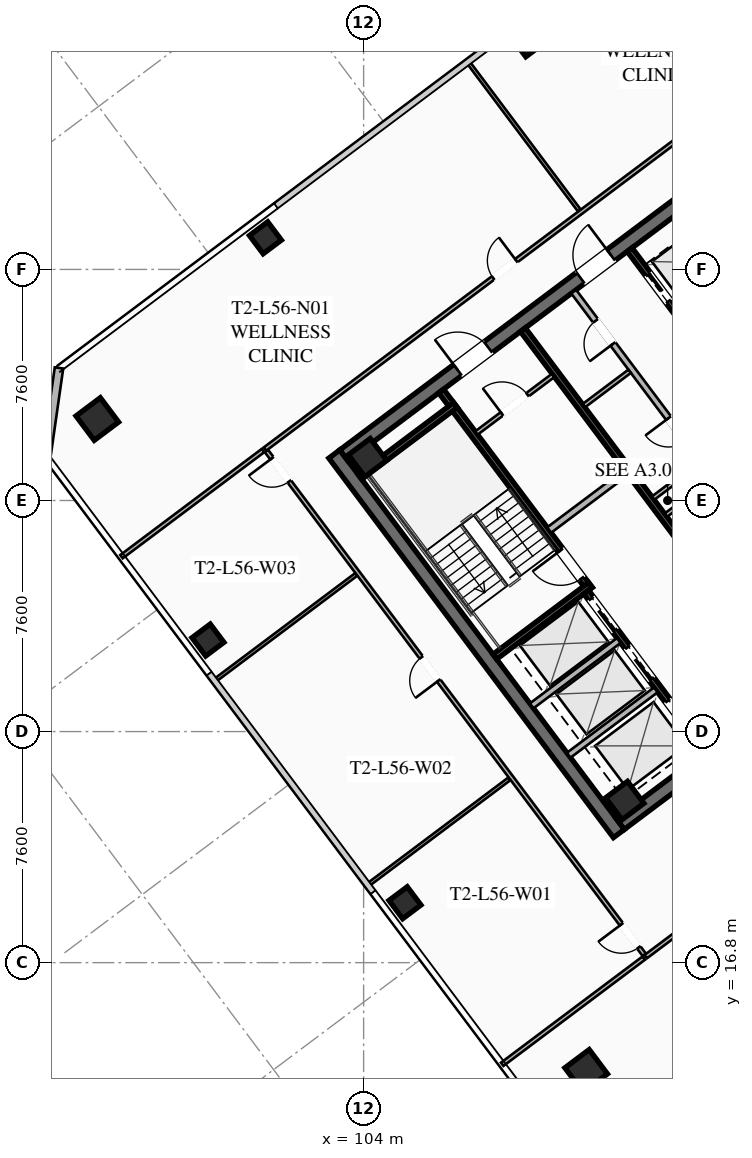
"""IFC4 building model, lengths in metres.
Left out: names, types, materials, properties, quantities, classifications, styles, units other than length and angle.
Written with IfcOpenShell. Run it as: python <this file> out.ifc"""

import sys

from ifc_helpers import new_model, si_unit, direction, frame, frame_2d, origin, origin_2d, place, context, subcontext, project, spatial, rectangle, hollow_rectangle, extrude, element, fill, save


model = new_model("IFC4")
c1 = context("Model", 3, precision=1e-05, world=origin(), true_north=direction((0.0, 1.0)))
c2 = subcontext(c1, "Body", "Model", "MODEL_VIEW")
j1 = project(units=[si_unit("LENGTHUNIT", "METRE"), si_unit("PLANEANGLEUNIT", "RADIAN")], contexts=[c1])
p1 = place(None, origin())
s1 = spatial("IfcSite", under=j1, at=p1, CompositionType="ELEMENT")
p2 = place(p1, origin())
s2 = spatial("IfcBuilding", under=s1, at=p2, CompositionType="ELEMENT")
p3 = place(p2, frame((0.0, 0.0, 207.75)))
s3 = spatial("IfcBuildingStorey", under=s2, at=p3, CompositionType="ELEMENT", Elevation=207.75)
p4 = place(p3, frame((112.396, 21.047, 0.0), z_axis=(0.0, 0.0, 1.0), x_axis=(-0.600005007985, 0.799996243986, 0.0)))
e1 = element("IfcWall", 1, at=p4, inside=s3, PredefinedType="SHEAR", context=c2, shape_type="SweptSolid", body=[
    extrude(rectangle(XDim=15.6, YDim=0.45, at=frame_2d((7.8, 0.0))), origin(), (0.0, 0.0, 1.0), 3.55),
])
p5 = place(p3, frame((124.649, 30.518, 0.0), z_axis=(0.0, 0.0, 1.0), x_axis=(-0.8, -0.6, 0.0)))
e2 = element("IfcWall", 2, at=p5, inside=s3, PredefinedType="SHEAR", context=c2, shape_type="SweptSolid", body=[
    extrude(rectangle(XDim=15.26, YDim=0.45, at=frame_2d((7.63, 0.0))), origin(), (0.0, 0.0, 1.0), 3.55),
])
p6 = place(p5, frame((9.33, 0.0, 0.0)))
e3 = element("IfcOpeningElement", 3, at=p6, cuts=e2, PredefinedType="OPENING", context=c2, shape_type="SweptSolid", body=[
    extrude(rectangle(XDim=1.25, YDim=2.25, at=frame_2d((0.625, 1.125))), frame((0.0, 0.235, 0.0), z_axis=(0.0, -1.0, 0.0), x_axis=(1.0, 0.0, 0.0)), (0.0, 0.0, 1.0), 0.47),
])
p7 = place(p5, frame((4.28, 0.0, 0.0)))
e4 = element("IfcOpeningElement", 4, at=p7, cuts=e2, PredefinedType="OPENING", context=c2, shape_type="SweptSolid", body=[
    extrude(rectangle(XDim=1.25, YDim=2.25, at=frame_2d((0.625, 1.125))), frame((0.0, 0.235, 0.0), z_axis=(0.0, -1.0, 0.0), x_axis=(1.0, 0.0, 0.0)), (0.0, 0.0, 1.0), 0.47),
])
p8 = place(p3, frame((103.351, 33.482, 0.0), z_axis=(0.0, 0.0, 1.0), x_axis=(0.8, 0.6, 0.0)))
e5 = element("IfcWall", 5, at=p8, inside=s3, PredefinedType="SHEAR", context=c2, shape_type="SweptSolid", body=[
    extrude(rectangle(XDim=15.26, YDim=0.45, at=frame_2d((7.63, 0.0))), origin(), (0.0, 0.0, 1.0), 3.55),
])
p9 = place(p8, frame((4.68, 0.0, 0.0)))
e6 = element("IfcOpeningElement", 6, at=p9, cuts=e5, PredefinedType="OPENING", context=c2, shape_type="SweptSolid", body=[
    extrude(rectangle(XDim=1.25, YDim=2.25, at=frame_2d((0.625, 1.125))), frame((0.0, 0.235, 0.0), z_axis=(0.0, -1.0, 0.0), x_axis=(1.0, 0.0, 0.0)), (0.0, 0.0, 1.0), 0.47),
])
p10 = place(p8, frame((9.73, 0.0, 0.0)))
e7 = element("IfcOpeningElement", 7, at=p10, cuts=e5, PredefinedType="OPENING", context=c2, shape_type="SweptSolid", body=[
    extrude(rectangle(XDim=1.25, YDim=2.25, at=frame_2d((0.625, 1.125))), frame((0.0, 0.235, 0.0), z_axis=(0.0, -1.0, 0.0), x_axis=(1.0, 0.0, 0.0)), (0.0, 0.0, 1.0), 0.47),
])
for number, where, z_axis, x_axis in (
    (8, (112.59, 22.13, 0.0), (0.0, 0.0, 1.0), (0.8, 0.6, 0.0)),
    (9, (104.13, 33.41, 0.0), (0.0, 0.0, 1.0), (0.8, 0.6, 0.0)),
):
    element("IfcColumn", number, at=place(p3, frame(where, z_axis=z_axis, x_axis=x_axis)), inside=s3, PredefinedType="COLUMN", context=c2, shape_type="SweptSolid", body=[
        extrude(hollow_rectangle(XDim=0.9, YDim=0.9, WallThickness=0.04, at=origin_2d()), origin(), (0.0, 0.0, 1.0), 3.37),
    ])
for number, where, z_axis, x_axis in (
    (10, (111.32, 13.24, 0.0), (0.0, 0.0, 1.0), (0.8, 0.6, 0.0)),
    (11, (95.24, 34.68, 0.0), (0.0, 0.0, 1.0), (0.8, 0.6, 0.0)),
):
    element("IfcColumn", number, at=place(p3, frame(where, z_axis=z_axis, x_axis=x_axis)), inside=s3, PredefinedType="COLUMN", context=c2, shape_type="SweptSolid", body=[
        extrude(hollow_rectangle(XDim=1.0, YDim=1.0, WallThickness=0.04, at=origin_2d()), origin(), (0.0, 0.0, 1.0), 3.37),
    ])
for number, where, z_axis, x_axis in (
    (12, (109.41, 47.12, 0.0), (0.0, 0.0, 1.0), (0.8, 0.6, 0.0)),
    (13, (100.77, 40.64, 0.0), (0.0, 0.0, 1.0), (0.8, 0.6, 0.0)),
    (14, (98.88, 27.41, 0.0), (0.0, 0.0, 1.0), (0.8, 0.6, 0.0)),
    (15, (105.36, 18.77, 0.0), (0.0, 0.0, 1.0), (0.8, 0.6, 0.0)),
):
    element("IfcColumn", number, at=place(p3, frame(where, z_axis=z_axis, x_axis=x_axis)), inside=s3, PredefinedType="COLUMN", context=c2, shape_type="SweptSolid", body=[
        extrude(hollow_rectangle(XDim=0.75, YDim=0.75, WallThickness=0.032, at=origin_2d()), origin(), (0.0, 0.0, 1.0), 3.37),
    ])
p11 = place(p3, frame((93.56, 33.42, 0.0), z_axis=(0.0, 0.0, 1.0), x_axis=(0.14138683146, 0.989954425158, 0.0)))
e16 = element("IfcWall", 16, at=p11, inside=s3, PredefinedType="SOLIDWALL", context=c2, shape_type="SweptSolid", body=[
    extrude(rectangle(XDim=2.97, YDim=0.28, at=frame_2d((1.485, 0.0))), origin(), (0.0, 0.0, 1.0), 3.37),
])
p12 = place(p3, frame((111.44, 29.08, 0.0), z_axis=(0.0, 0.0, 1.0), x_axis=(-0.59999041401, 0.800007189403, 0.0)))
e17 = element("IfcWall", 17, at=p12, inside=s3, PredefinedType="SHEAR", context=c2, shape_type="SweptSolid", body=[
    extrude(rectangle(XDim=8.15, YDim=0.2, at=frame_2d((4.075, 0.0))), origin(), (0.0, 0.0, 1.0), 3.37),
])
p13 = place(p12, frame((0.45, 0.0, 0.0)))
e18 = element("IfcOpeningElement", 18, at=p13, cuts=e17, PredefinedType="OPENING", context=c2, shape_type="SweptSolid", body=[
    extrude(rectangle(XDim=1.15, YDim=2.2, at=frame_2d((0.575, 1.1))), frame((0.0, 0.11, 0.0), z_axis=(0.0, -1.0, 0.0), x_axis=(1.0, 0.0, 0.0)), (0.0, 0.0, 1.0), 0.22),
])
for number, where, z_axis, x_axis in (
    (19, (108.316, 26.862, 0.0), (0.0, 0.0, 1.0), (0.8, 0.6, 0.0)),
    (20, (103.876, 32.782, 0.0), (0.0, 0.0, 1.0), (0.8, 0.6, 0.0)),
):
    element("IfcWall", number, at=place(p3, frame(where, z_axis=z_axis, x_axis=x_axis)), inside=s3, PredefinedType="SHEAR", context=c2, shape_type="SweptSolid", body=[
        extrude(rectangle(XDim=3.93, YDim=0.2, at=frame_2d((1.965, 0.0))), origin(), (0.0, 0.0, 1.0), 3.37),
    ])
p14 = place(p3, frame((118.058, 25.856, 0.0), z_axis=(0.0, 0.0, 1.0), x_axis=(-0.600002657301, 0.799998007018, 0.0)))
e21 = element("IfcWall", 21, at=p14, inside=s3, PredefinedType="SHEAR", context=c2, shape_type="SweptSolid", body=[
    extrude(rectangle(XDim=14.7, YDim=0.2, at=frame_2d((7.35, 0.0))), origin(), (0.0, 0.0, 1.0), 3.37),
])
p15 = place(p3, frame((110.104, 31.028, 0.0), z_axis=(0.0, 0.0, 1.0), x_axis=(0.800018601094, 0.59997519774, 0.0)))
e22 = element("IfcWall", 22, at=p15, inside=s3, PredefinedType="SOLIDWALL", context=c2, shape_type="SweptSolid", body=[
    extrude(rectangle(XDim=3.15, YDim=0.22, at=frame_2d((1.575, 0.0))), origin(), (0.0, 0.0, 1.0), 2.723),
])
p16 = place(p3, frame((115.25, 23.75, 0.0), z_axis=(0.0, 0.0, 1.0), x_axis=(-0.599994036198, 0.800004472816, 0.0)))
e23 = element("IfcWall", 23, at=p16, inside=s3, PredefinedType="SHEAR", context=c2, shape_type="SweptSolid", body=[
    extrude(rectangle(XDim=6.55, YDim=0.2, at=frame_2d((3.275, 0.0))), origin(), (0.0, 0.0, 1.0), 3.37),
])
p17 = place(p16, frame((4.975, 0.0, 0.0)))
e24 = element("IfcOpeningElement", 24, at=p17, cuts=e23, PredefinedType="OPENING", context=c2, shape_type="SweptSolid", body=[
    extrude(rectangle(XDim=1.3, YDim=2.25, at=frame_2d((0.65, 1.125))), frame((0.0, 0.11, 0.0), z_axis=(0.0, -1.0, 0.0), x_axis=(1.0, 0.0, 0.0)), (0.0, 0.0, 1.0), 0.22),
])
p18 = place(p16, frame((2.975, 0.0, 0.0)))
e25 = element("IfcOpeningElement", 25, at=p18, cuts=e23, PredefinedType="OPENING", context=c2, shape_type="SweptSolid", body=[
    extrude(rectangle(XDim=1.3, YDim=2.25, at=frame_2d((0.65, 1.125))), frame((0.0, 0.11, 0.0), z_axis=(0.0, -1.0, 0.0), x_axis=(1.0, 0.0, 0.0)), (0.0, 0.0, 1.0), 0.22),
])
p19 = place(p16, frame((0.775, 0.0, 0.0)))
e26 = element("IfcOpeningElement", 26, at=p19, cuts=e23, PredefinedType="OPENING", context=c2, shape_type="SweptSolid", body=[
    extrude(rectangle(XDim=1.3, YDim=2.25, at=frame_2d((0.65, 1.125))), frame((0.0, 0.11, 0.0), z_axis=(0.0, -1.0, 0.0), x_axis=(1.0, 0.0, 0.0)), (0.0, 0.0, 1.0), 0.22),
])
for number, where, z_axis, x_axis in (
    (27, (110.746, 23.622, 0.0), (0.0, 0.0, 1.0), (0.8, 0.6, 0.0)),
    (28, (109.528, 25.246, 0.0), (0.0, 0.0, 1.0), (0.8, 0.6, 0.0)),
):
    element("IfcWall", number, at=place(p3, frame(where, z_axis=z_axis, x_axis=x_axis)), inside=s3, PredefinedType="SOLIDWALL", context=c2, shape_type="SweptSolid", body=[
        extrude(rectangle(XDim=3.58, YDim=0.2, at=frame_2d((1.79, 0.0))), origin(), (0.0, 0.0, 1.0), 3.37),
    ])
p20 = place(p3, frame((112.75, 40.25, 0.0), z_axis=(0.0, 0.0, 1.0), x_axis=(0.599994036198, -0.800004472816, 0.0)))
e29 = element("IfcWall", 29, at=p20, inside=s3, PredefinedType="SHEAR", context=c2, shape_type="SweptSolid", body=[
    extrude(rectangle(XDim=6.55, YDim=0.2, at=frame_2d((3.275, 0.0))), origin(), (0.0, 0.0, 1.0), 3.37),
])
p21 = place(p20, frame((5.075, 0.0, 0.0)))
e30 = element("IfcOpeningElement", 30, at=p21, cuts=e29, PredefinedType="OPENING", context=c2, shape_type="SweptSolid", body=[
    extrude(rectangle(XDim=1.1, YDim=2.2, at=frame_2d((0.55, 1.1))), frame((0.0, 0.11, 0.0), z_axis=(0.0, -1.0, 0.0), x_axis=(1.0, 0.0, 0.0)), (0.0, 0.0, 1.0), 0.22),
])
p22 = place(p20, frame((3.025, 0.0, 0.0)))
e31 = element("IfcOpeningElement", 31, at=p22, cuts=e29, PredefinedType="OPENING", context=c2, shape_type="SweptSolid", body=[
    extrude(rectangle(XDim=1.1, YDim=2.2, at=frame_2d((0.55, 1.1))), frame((0.0, 0.11, 0.0), z_axis=(0.0, -1.0, 0.0), x_axis=(1.0, 0.0, 0.0)), (0.0, 0.0, 1.0), 0.22),
])
p23 = place(p20, frame((1.025, 0.0, 0.0)))
e32 = element("IfcOpeningElement", 32, at=p23, cuts=e29, PredefinedType="OPENING", context=c2, shape_type="SweptSolid", body=[
    extrude(rectangle(XDim=1.1, YDim=2.2, at=frame_2d((0.55, 1.1))), frame((0.0, 0.11, 0.0), z_axis=(0.0, -1.0, 0.0), x_axis=(1.0, 0.0, 0.0)), (0.0, 0.0, 1.0), 0.22),
])
p24 = place(p3, frame((107.71, 34.22, 0.0), z_axis=(0.0, 0.0, 1.0), x_axis=(0.799981399002, 0.60002480053, 0.0)))
e33 = element("IfcWall", 33, at=p24, inside=s3, PredefinedType="PARTITIONING", context=c2, shape_type="SweptSolid", body=[
    extrude(rectangle(XDim=3.15, YDim=0.135, at=frame_2d((1.575, 0.0))), origin(), (0.0, 0.0, 1.0), 2.723),
])
p25 = place(p24, frame((1.05, 0.0, 0.0)))
e34 = element("IfcOpeningElement", 34, at=p25, cuts=e33, PredefinedType="OPENING", context=c2, shape_type="SweptSolid", body=[
    extrude(rectangle(XDim=1.05, YDim=2.2, at=frame_2d((0.525, 1.1))), frame((0.0, 0.077, 0.0), z_axis=(0.0, -1.0, 0.0), x_axis=(1.0, 0.0, 0.0)), (0.0, 0.0, 1.0), 0.155),
])
p26 = place(p3, frame((113.946, 31.522, 0.0), z_axis=(0.0, 0.0, 1.0), x_axis=(0.8, 0.6, 0.0)))
e35 = element("IfcWall", 35, at=p26, inside=s3, PredefinedType="PARTITIONING", context=c2, shape_type="SweptSolid", body=[
    extrude(rectangle(XDim=1.88, YDim=0.135, at=frame_2d((0.94, 0.0))), origin(), (0.0, 0.0, 1.0), 2.723),
])
p27 = place(p3, frame((115.11, 33.27, 0.0), z_axis=(0.0, 0.0, 1.0), x_axis=(-0.600011160345, 0.79999162962, 0.0)))
e36 = element("IfcWall", 36, at=p27, inside=s3, PredefinedType="SOLIDWALL", context=c2, shape_type="SweptSolid", body=[
    extrude(rectangle(XDim=7.0, YDim=0.2, at=frame_2d((3.5, 0.0))), origin(), (0.0, 0.0, 1.0), 2.723),
])
p28 = place(p27, frame((0.85, 0.0, 0.0)))
e37 = element("IfcOpeningElement", 37, at=p28, cuts=e36, PredefinedType="OPENING", context=c2, shape_type="SweptSolid", body=[
    extrude(rectangle(XDim=0.95, YDim=2.05, at=frame_2d((0.475, 1.025))), frame((0.0, 0.11, 0.0), z_axis=(0.0, -1.0, 0.0), x_axis=(1.0, 0.0, 0.0)), (0.0, 0.0, 1.0), 0.22),
])
p29 = place(p27, frame((4.85, 0.0, 0.0)))
e38 = element("IfcOpeningElement", 38, at=p29, cuts=e36, PredefinedType="OPENING", context=c2, shape_type="SweptSolid", body=[
    extrude(rectangle(XDim=0.95, YDim=2.05, at=frame_2d((0.475, 1.025))), frame((0.0, 0.11, 0.0), z_axis=(0.0, -1.0, 0.0), x_axis=(1.0, 0.0, 0.0)), (0.0, 0.0, 1.0), 0.22),
])
p30 = place(p3, frame((113.526, 32.082, 0.0), z_axis=(0.0, 0.0, 1.0), x_axis=(0.800046745961, 0.599937666993, 0.0)))
e39 = element("IfcWall", 39, at=p30, inside=s3, PredefinedType="PARTITIONING", context=c2, shape_type="SweptSolid", body=[
    extrude(rectangle(XDim=1.88, YDim=0.135, at=frame_2d((0.94, 0.0))), origin(), (0.0, 0.0, 1.0), 2.723),
])
p31 = place(p3, frame((111.246, 35.122, 0.0), z_axis=(0.0, 0.0, 1.0), x_axis=(0.8, 0.6, 0.0)))
e40 = element("IfcWall", 40, at=p31, inside=s3, PredefinedType="PARTITIONING", context=c2, shape_type="SweptSolid", body=[
    extrude(rectangle(XDim=1.88, YDim=0.135, at=frame_2d((0.94, 0.0))), origin(), (0.0, 0.0, 1.0), 2.723),
])
p32 = place(p3, frame((100.756, 33.692, 0.0), z_axis=(0.0, 0.0, 1.0), x_axis=(0.799998716732, 0.60000171102, 0.0)))
e41 = element("IfcWall", 41, at=p32, inside=s3, PredefinedType="PARTITIONING", context=c2, shape_type="SweptSolid", body=[
    extrude(rectangle(XDim=22.83, YDim=0.135, at=frame_2d((11.415, 0.0))), origin(), (0.0, 0.0, 1.0), 2.723),
])
p33 = place(p32, frame((9.38, 0.0, 0.0)))
e42 = element("IfcOpeningElement", 42, at=p33, cuts=e41, PredefinedType="OPENING", context=c2, shape_type="SweptSolid", body=[
    extrude(rectangle(XDim=0.95, YDim=2.05, at=frame_2d((0.475, 1.025))), frame((0.0, 0.077, 0.0), z_axis=(0.0, -1.0, 0.0), x_axis=(1.0, 0.0, 0.0)), (0.0, 0.0, 1.0), 0.155),
])
p34 = place(p32, frame((21.58, 0.0, 0.0)))
e43 = element("IfcOpeningElement", 43, at=p34, cuts=e41, PredefinedType="OPENING", context=c2, shape_type="SweptSolid", body=[
    extrude(rectangle(XDim=0.95, YDim=2.05, at=frame_2d((0.475, 1.025))), frame((0.0, 0.077, 0.0), z_axis=(0.0, -1.0, 0.0), x_axis=(1.0, 0.0, 0.0)), (0.0, 0.0, 1.0), 0.155),
])
p35 = place(p3, frame((111.092, 41.544, 0.0), z_axis=(0.0, 0.0, 1.0), x_axis=(-0.600006403464, 0.799995197362, 0.0)))
e44 = element("IfcWall", 44, at=p35, inside=s3, PredefinedType="PARTITIONING", context=c2, shape_type="SweptSolid", body=[
    extrude(rectangle(XDim=6.1, YDim=0.11, at=frame_2d((3.05, 0.0))), origin(), (0.0, 0.0, 1.0), 2.723),
])
p36 = place(p3, frame((124.462, 25.384, 0.0), z_axis=(0.0, 0.0, 1.0), x_axis=(-0.799997904343, -0.6000027942, 0.0)))
e45 = element("IfcWall", 45, at=p36, inside=s3, PredefinedType="PARTITIONING", context=c2, shape_type="SweptSolid", body=[
    extrude(rectangle(XDim=13.98, YDim=0.135, at=frame_2d((6.99, 0.0))), origin(), (0.0, 0.0, 1.0), 2.723),
])
p37 = place(p36, frame((3.635, 0.0, 0.0)))
e46 = element("IfcOpeningElement", 46, at=p37, cuts=e45, PredefinedType="OPENING", context=c2, shape_type="SweptSolid", body=[
    extrude(rectangle(XDim=0.95, YDim=2.05, at=frame_2d((0.475, 1.025))), frame((0.0, 0.077, 0.0), z_axis=(0.0, -1.0, 0.0), x_axis=(1.0, 0.0, 0.0)), (0.0, 0.0, 1.0), 0.155),
])
p38 = place(p3, frame((113.23, 17.06, 0.0), z_axis=(0.0, 0.0, 1.0), x_axis=(-0.600003772342, 0.79999717073, 0.0)))
e47 = element("IfcWall", 47, at=p38, inside=s3, PredefinedType="PARTITIONING", context=c2, shape_type="SweptSolid", body=[
    extrude(rectangle(XDim=20.71, YDim=0.135, at=frame_2d((10.355, 0.0))), origin(), (0.0, 0.0, 1.0), 2.723),
])
p39 = place(p38, frame((0.3, 0.0, 0.0)))
e48 = element("IfcOpeningElement", 48, at=p39, cuts=e47, PredefinedType="OPENING", context=c2, shape_type="SweptSolid", body=[
    extrude(rectangle(XDim=0.95, YDim=2.05, at=frame_2d((0.475, 1.025))), frame((0.0, 0.077, 0.0), z_axis=(0.0, -1.0, 0.0), x_axis=(1.0, 0.0, 0.0)), (0.0, 0.0, 1.0), 0.155),
])
p40 = place(p38, frame((11.272, 0.0, 0.0)))
e49 = element("IfcOpeningElement", 49, at=p40, cuts=e47, PredefinedType="OPENING", context=c2, shape_type="SweptSolid", body=[
    extrude(rectangle(XDim=0.95, YDim=2.05, at=frame_2d((0.475, 1.025))), frame((0.0, 0.077, 0.0), z_axis=(0.0, -1.0, 0.0), x_axis=(1.0, 0.0, 0.0)), (0.0, 0.0, 1.0), 0.155),
])
p41 = place(p38, frame((19.46, 0.0, 0.0)))
e50 = element("IfcOpeningElement", 50, at=p41, cuts=e47, PredefinedType="OPENING", context=c2, shape_type="SweptSolid", body=[
    extrude(rectangle(XDim=0.95, YDim=2.05, at=frame_2d((0.475, 1.025))), frame((0.0, 0.077, 0.0), z_axis=(0.0, -1.0, 0.0), x_axis=(1.0, 0.0, 0.0)), (0.0, 0.0, 1.0), 0.155),
])
for number, where, z_axis, x_axis in (
    (51, (100.692, 33.644, 0.0), (0.0, 0.0, 1.0), (-0.8, -0.6, 0.0)),
    (52, (108.558, 13.456, 0.0), (0.0, 0.0, 1.0), (0.8, 0.6, 0.0)),
):
    element("IfcWall", number, at=place(p3, frame(where, z_axis=z_axis, x_axis=x_axis)), inside=s3, PredefinedType="PARTITIONING", context=c2, shape_type="SweptSolid", body=[
        extrude(rectangle(XDim=5.82, YDim=0.135, at=frame_2d((2.91, 0.0))), origin(), (0.0, 0.0, 1.0), 2.723),
    ])
for number, where, z_axis, x_axis in (
    (53, (104.136, 19.352, 0.0), (0.0, 0.0, 1.0), (0.8, 0.6, 0.0)),
    (54, (99.096, 26.072, 0.0), (0.0, 0.0, 1.0), (0.8, 0.6, 0.0)),
):
    element("IfcWall", number, at=place(p3, frame(where, z_axis=z_axis, x_axis=x_axis)), inside=s3, PredefinedType="PARTITIONING", context=c2, shape_type="SweptSolid", body=[
        extrude(rectangle(XDim=5.82, YDim=0.11, at=frame_2d((2.91, 0.0))), origin(), (0.0, 0.0, 1.0), 2.723),
    ])
p42 = place(p9, origin())
e55 = element("IfcDoor", 55, at=p42, inside=s3, OperationType="SINGLE_SWING_LEFT", PredefinedType="DOOR", context=c2, shape_type="SweptSolid", body=[
    extrude(rectangle(XDim=1.25, YDim=2.25, at=frame_2d((0.625, 1.125))), frame((0.0, 0.025, 0.0), z_axis=(0.0, -1.0, 0.0), x_axis=(1.0, 0.0, 0.0)), (0.0, 0.0, 1.0), 0.05),
])
fill(e6, e55)
p43 = place(p10, origin())
e56 = element("IfcDoor", 56, at=p43, inside=s3, OperationType="SINGLE_SWING_RIGHT", PredefinedType="DOOR", context=c2, shape_type="SweptSolid", body=[
    extrude(rectangle(XDim=1.25, YDim=2.25, at=frame_2d((0.625, 1.125))), frame((0.0, 0.025, 0.0), z_axis=(0.0, -1.0, 0.0), x_axis=(1.0, 0.0, 0.0)), (0.0, 0.0, 1.0), 0.05),
])
fill(e7, e56)
p44 = place(p13, origin())
e57 = element("IfcDoor", 57, at=p44, inside=s3, OperationType="SINGLE_SWING_RIGHT", PredefinedType="DOOR", context=c2, shape_type="SweptSolid", body=[
    extrude(rectangle(XDim=1.15, YDim=2.2, at=frame_2d((0.575, 1.1))), frame((0.0, 0.025, 0.0), z_axis=(0.0, -1.0, 0.0), x_axis=(1.0, 0.0, 0.0)), (0.0, 0.0, 1.0), 0.05),
])
fill(e18, e57)
p45 = place(p25, origin())
e58 = element("IfcDoor", 58, at=p45, inside=s3, OperationType="SINGLE_SWING_LEFT", PredefinedType="DOOR", context=c2, shape_type="SweptSolid", body=[
    extrude(rectangle(XDim=1.05, YDim=2.2, at=frame_2d((0.525, 1.1))), frame((0.0, 0.025, 0.0), z_axis=(0.0, -1.0, 0.0), x_axis=(1.0, 0.0, 0.0)), (0.0, 0.0, 1.0), 0.05),
])
fill(e34, e58)
p46 = place(p28, origin())
e59 = element("IfcDoor", 59, at=p46, inside=s3, OperationType="SINGLE_SWING_RIGHT", PredefinedType="DOOR", context=c2, shape_type="SweptSolid", body=[
    extrude(rectangle(XDim=0.95, YDim=2.05, at=frame_2d((0.475, 1.025))), frame((0.0, 0.025, 0.0), z_axis=(0.0, -1.0, 0.0), x_axis=(1.0, 0.0, 0.0)), (0.0, 0.0, 1.0), 0.05),
])
fill(e37, e59)
p47 = place(p29, origin())
e60 = element("IfcDoor", 60, at=p47, inside=s3, OperationType="SINGLE_SWING_LEFT", PredefinedType="DOOR", context=c2, shape_type="SweptSolid", body=[
    extrude(rectangle(XDim=0.95, YDim=2.05, at=frame_2d((0.475, 1.025))), frame((0.0, 0.025, 0.0), z_axis=(0.0, -1.0, 0.0), x_axis=(1.0, 0.0, 0.0)), (0.0, 0.0, 1.0), 0.05),
])
fill(e38, e60)
p48 = place(p33, origin())
e61 = element("IfcDoor", 61, at=p48, inside=s3, OperationType="SINGLE_SWING_RIGHT", PredefinedType="DOOR", context=c2, shape_type="SweptSolid", body=[
    extrude(rectangle(XDim=0.95, YDim=2.05, at=frame_2d((0.475, 1.025))), frame((0.0, 0.025, 0.0), z_axis=(0.0, -1.0, 0.0), x_axis=(1.0, 0.0, 0.0)), (0.0, 0.0, 1.0), 0.05),
])
fill(e42, e61)
p49 = place(p39, origin())
e62 = element("IfcDoor", 62, at=p49, inside=s3, OperationType="SINGLE_SWING_RIGHT", PredefinedType="DOOR", context=c2, shape_type="SweptSolid", body=[
    extrude(rectangle(XDim=0.95, YDim=2.05, at=frame_2d((0.475, 1.025))), frame((0.0, 0.025, 0.0), z_axis=(0.0, -1.0, 0.0), x_axis=(1.0, 0.0, 0.0)), (0.0, 0.0, 1.0), 0.05),
])
fill(e48, e62)
p50 = place(p40, origin())
e63 = element("IfcDoor", 63, at=p50, inside=s3, OperationType="SINGLE_SWING_LEFT", PredefinedType="DOOR", context=c2, shape_type="SweptSolid", body=[
    extrude(rectangle(XDim=0.95, YDim=2.05, at=frame_2d((0.475, 1.025))), frame((0.0, 0.025, 0.0), z_axis=(0.0, -1.0, 0.0), x_axis=(1.0, 0.0, 0.0)), (0.0, 0.0, 1.0), 0.05),
])
fill(e49, e63)
p51 = place(p41, origin())
e64 = element("IfcDoor", 64, at=p51, inside=s3, OperationType="SINGLE_SWING_RIGHT", PredefinedType="DOOR", context=c2, shape_type="SweptSolid", body=[
    extrude(rectangle(XDim=0.95, YDim=2.05, at=frame_2d((0.475, 1.025))), frame((0.0, 0.025, 0.0), z_axis=(0.0, -1.0, 0.0), x_axis=(1.0, 0.0, 0.0)), (0.0, 0.0, 1.0), 0.05),
])
fill(e50, e64)
p52 = place(p17, origin())
e65 = element("IfcDoor", 65, at=p52, inside=s3, OperationType="SLIDING_TO_LEFT", PredefinedType="DOOR", context=c2, shape_type="SweptSolid", body=[
    extrude(rectangle(XDim=1.3, YDim=2.25, at=frame_2d((0.65, 1.125))), frame((0.0, 0.025, 0.0), z_axis=(0.0, -1.0, 0.0), x_axis=(1.0, 0.0, 0.0)), (0.0, 0.0, 1.0), 0.05),
])
fill(e24, e65)
p53 = place(p18, origin())
e66 = element("IfcDoor", 66, at=p53, inside=s3, OperationType="SLIDING_TO_LEFT", PredefinedType="DOOR", context=c2, shape_type="SweptSolid", body=[
    extrude(rectangle(XDim=1.3, YDim=2.25, at=frame_2d((0.65, 1.125))), frame((0.0, 0.025, 0.0), z_axis=(0.0, -1.0, 0.0), x_axis=(1.0, 0.0, 0.0)), (0.0, 0.0, 1.0), 0.05),
])
fill(e25, e66)
p54 = place(p19, origin())
e67 = element("IfcDoor", 67, at=p54, inside=s3, OperationType="SLIDING_TO_LEFT", PredefinedType="DOOR", context=c2, shape_type="SweptSolid", body=[
    extrude(rectangle(XDim=1.3, YDim=2.25, at=frame_2d((0.65, 1.125))), frame((0.0, 0.025, 0.0), z_axis=(0.0, -1.0, 0.0), x_axis=(1.0, 0.0, 0.0)), (0.0, 0.0, 1.0), 0.05),
])
fill(e26, e67)
p55 = place(p23, origin())
e68 = element("IfcDoor", 68, at=p55, inside=s3, OperationType="SLIDING_TO_LEFT", PredefinedType="DOOR", context=c2, shape_type="SweptSolid", body=[
    extrude(rectangle(XDim=1.1, YDim=2.2, at=frame_2d((0.55, 1.1))), frame((0.0, 0.025, 0.0), z_axis=(0.0, -1.0, 0.0), x_axis=(1.0, 0.0, 0.0)), (0.0, 0.0, 1.0), 0.05),
])
fill(e32, e68)
save(model, sys.argv[1])
